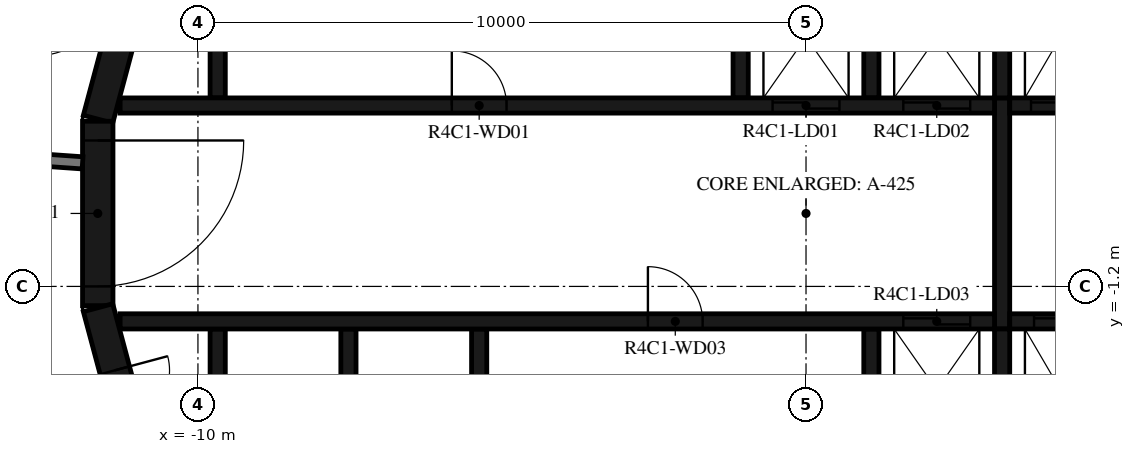
"""IFC4 building model, lengths in metres.
Left out: names, types, materials, properties, quantities, classifications, styles, units other than length and angle.
Written with IfcOpenShell. Run it as: python <this file> out.ifc"""

import sys

from ifc_helpers import new_model, si_unit, direction, frame, frame_2d, origin, place, context, subcontext, project, spatial, polyline, rectangle, outline, extrude, element, fill, save


model = new_model("IFC4")
c1 = context("Model", 3, precision=1e-05, world=origin(), true_north=direction((0.0, 1.0)))
c2 = subcontext(c1, "Body", "Model", "MODEL_VIEW")
j1 = project(units=[si_unit("LENGTHUNIT", "METRE"), si_unit("PLANEANGLEUNIT", "RADIAN")], contexts=[c1])
p1 = place(None, origin())
s1 = spatial("IfcSite", under=j1, at=p1, CompositionType="ELEMENT")
p2 = place(p1, origin())
s2 = spatial("IfcBuilding", under=s1, at=p2, CompositionType="ELEMENT")
p3 = place(p2, frame((0.0, 0.0, 176.2)))
s3 = spatial("IfcBuildingStorey", under=s2, at=p3, CompositionType="ELEMENT", Elevation=176.2)
p4 = place(p3, frame((-10.858, 4.479, 0.0), z_axis=(0.0, 0.0, 1.0), x_axis=(-0.258734743916, -0.965948410781, 0.0)))
e1 = element("IfcWall", 1, at=p4, inside=s3, PredefinedType="SHEAR", context=c2, shape_type="SweptSolid", body=[
    extrude(rectangle(XDim=3.033, YDim=0.5, at=frame_2d((1.516, 0.0))), origin(), (0.0, 0.0, 1.0), 3.12),
])
p5 = place(p3, frame((-11.647, 1.516, 0.0), z_axis=(0.0, 0.0, 1.0), x_axis=(0.0, -1.0, 0.0)))
e2 = element("IfcWall", 2, at=p5, inside=s3, PredefinedType="SHEAR", context=c2, shape_type="SweptSolid", body=[
    extrude(rectangle(XDim=3.033, YDim=0.5, at=frame_2d((1.516, 0.0))), origin(), (0.0, 0.0, 1.0), 3.12),
])
p6 = place(p5, frame((0.316, 0.0, 0.0)))
e3 = element("IfcOpeningElement", 3, at=p6, cuts=e2, PredefinedType="OPENING", context=c2, shape_type="SweptSolid", body=[
    extrude(rectangle(XDim=2.4, YDim=2.1, at=frame_2d((1.2, 1.05))), frame((0.0, 0.26, 0.0), z_axis=(0.0, -1.0, 0.0), x_axis=(1.0, 0.0, 0.0)), (0.0, 0.0, 1.0), 0.52),
])
p7 = place(p3, frame((-11.643, -1.55, 0.0), z_axis=(0.0, 0.0, 1.0), x_axis=(0.258734743916, -0.965948410781, 0.0)))
e4 = element("IfcWall", 4, at=p7, inside=s3, PredefinedType="SHEAR", context=c2, shape_type="SweptSolid", body=[
    extrude(rectangle(XDim=3.033, YDim=0.5, at=frame_2d((1.516, 0.0))), origin(), (0.0, 0.0, 1.0), 3.12),
])
p8 = place(p7, frame((1.066, 0.0, 0.0)))
e5 = element("IfcOpeningElement", 5, at=p8, cuts=e4, PredefinedType="OPENING", context=c2, shape_type="SweptSolid", body=[
    extrude(rectangle(XDim=0.9, YDim=2.1, at=frame_2d((0.45, 1.05))), frame((0.0, 0.26, 0.0), z_axis=(0.0, -1.0, 0.0), x_axis=(1.0, 0.0, 0.0)), (0.0, 0.0, 1.0), 0.52),
])
p9 = place(p3, origin())
e6 = element("IfcWall", 6, at=p9, inside=s3, PredefinedType="SHEAR", context=c2, shape_type="SweptSolid", body=[
    extrude(outline(polyline([(-9.55, 4.8), (-1.2, 4.8), (-1.2, 1.9), (-0.95, 1.9), (-0.95, 4.8), (0.95, 4.8), (0.95, 1.9), (1.2, 1.9), (1.2, 4.8), (3.1, 4.8), (3.1, 1.9), (3.35, 1.9), (3.35, 4.8), (5.25, 4.8), (5.25, 1.9), (5.5, 1.9), (5.5, 4.8), (7.4, 4.8), (7.4, 1.9), (7.65, 1.9), (7.65, 4.8), (9.55, 4.8), (9.55, 1.9), (9.8, 1.9), (9.8, 4.8), (9.8, 5.05), (-9.8, 5.05), (-9.8, 4.8), (-9.8, 1.9), (-9.55, 1.9), (-9.55, 4.8)])), origin(), (0.0, 0.0, 1.0), 3.12),
])
p10 = place(p3, origin())
e7 = element("IfcWall", 7, at=p10, inside=s3, PredefinedType="SHEAR", context=c2, shape_type="SweptSolid", body=[
    extrude(outline(polyline([(9.8, -5.05), (9.8, -4.8), (9.8, -1.9), (9.55, -1.9), (9.55, -4.8), (7.65, -4.8), (7.65, -1.9), (7.4, -1.9), (7.4, -4.8), (5.5, -4.8), (5.5, -1.9), (5.25, -1.9), (5.25, -4.8), (3.35, -4.8), (3.35, -1.9), (3.1, -1.9), (3.1, -4.8), (1.2, -4.8), (1.2, -1.9), (0.95, -1.9), (0.95, -4.8), (-5.25, -4.8), (-5.25, -1.9), (-5.5, -1.9), (-5.5, -4.8), (-7.4, -4.8), (-7.4, -1.9), (-7.65, -1.9), (-7.65, -4.8), (-9.55, -4.8), (-9.55, -1.9), (-9.8, -1.9), (-9.8, -4.8), (-9.8, -5.05), (9.8, -5.05)])), origin(), (0.0, 0.0, 1.0), 3.12),
])
p11 = place(p3, frame((-11.28, 1.775, 0.0), z_axis=(0.0, 0.0, 1.0), x_axis=(1.0, 0.0, 0.0)))
e8 = element("IfcWall", 8, at=p11, inside=s3, PredefinedType="SHEAR", context=c2, shape_type="SweptSolid", body=[
    extrude(rectangle(XDim=14.38, YDim=0.25, at=frame_2d((7.19, 0.0))), origin(), (0.0, 0.0, 1.0), 3.12),
])
p12 = place(p11, frame((10.73, 0.0, 0.0)))
e9 = element("IfcOpeningElement", 9, at=p12, cuts=e8, PredefinedType="OPENING", context=c2, shape_type="SweptSolid", body=[
    extrude(rectangle(XDim=1.1, YDim=2.1, at=frame_2d((0.55, 1.05))), frame((0.0, 0.135, 0.0), z_axis=(0.0, -1.0, 0.0), x_axis=(1.0, 0.0, 0.0)), (0.0, 0.0, 1.0), 0.27),
])
p13 = place(p11, frame((12.88, 0.0, 0.0)))
e10 = element("IfcOpeningElement", 10, at=p13, cuts=e8, PredefinedType="OPENING", context=c2, shape_type="SweptSolid", body=[
    extrude(rectangle(XDim=1.1, YDim=2.1, at=frame_2d((0.55, 1.05))), frame((0.0, 0.135, 0.0), z_axis=(0.0, -1.0, 0.0), x_axis=(1.0, 0.0, 0.0)), (0.0, 0.0, 1.0), 0.27),
])
p14 = place(p11, frame((5.455, 0.0, 0.0)))
e11 = element("IfcOpeningElement", 11, at=p14, cuts=e8, PredefinedType="OPENING", context=c2, shape_type="SweptSolid", body=[
    extrude(rectangle(XDim=0.9, YDim=2.1, at=frame_2d((0.45, 1.05))), frame((0.0, 0.135, 0.0), z_axis=(0.0, -1.0, 0.0), x_axis=(1.0, 0.0, 0.0)), (0.0, 0.0, 1.0), 0.27),
])
p15 = place(p3, frame((3.35, 1.775, 0.0), z_axis=(0.0, 0.0, 1.0), x_axis=(1.0, 0.0, 0.0)))
e12 = element("IfcWall", 12, at=p15, inside=s3, PredefinedType="SHEAR", context=c2, shape_type="SweptSolid", body=[
    extrude(rectangle(XDim=7.93, YDim=0.25, at=frame_2d((3.965, 0.0))), origin(), (0.0, 0.0, 1.0), 3.12),
])
p16 = place(p15, frame((0.35, 0.0, 0.0)))
e13 = element("IfcOpeningElement", 13, at=p16, cuts=e12, PredefinedType="OPENING", context=c2, shape_type="SweptSolid", body=[
    extrude(rectangle(XDim=1.2, YDim=2.4, at=frame_2d((0.6, 1.2))), frame((0.0, 0.135, 0.0), z_axis=(0.0, -1.0, 0.0), x_axis=(1.0, 0.0, 0.0)), (0.0, 0.0, 1.0), 0.27),
])
p17 = place(p15, frame((2.5, 0.0, 0.0)))
e14 = element("IfcOpeningElement", 14, at=p17, cuts=e12, PredefinedType="OPENING", context=c2, shape_type="SweptSolid", body=[
    extrude(rectangle(XDim=1.2, YDim=2.4, at=frame_2d((0.6, 1.2))), frame((0.0, 0.135, 0.0), z_axis=(0.0, -1.0, 0.0), x_axis=(1.0, 0.0, 0.0)), (0.0, 0.0, 1.0), 0.27),
])
p18 = place(p15, frame((4.8, 0.0, 0.0)))
e15 = element("IfcOpeningElement", 15, at=p18, cuts=e12, PredefinedType="OPENING", context=c2, shape_type="SweptSolid", body=[
    extrude(rectangle(XDim=0.9, YDim=2.1, at=frame_2d((0.45, 1.05))), frame((0.0, 0.135, 0.0), z_axis=(0.0, -1.0, 0.0), x_axis=(1.0, 0.0, 0.0)), (0.0, 0.0, 1.0), 0.27),
])
p19 = place(p3, frame((-11.28, -1.775, 0.0), z_axis=(0.0, 0.0, 1.0), x_axis=(1.0, 0.0, 0.0)))
e16 = element("IfcWall", 16, at=p19, inside=s3, PredefinedType="SHEAR", context=c2, shape_type="SweptSolid", body=[
    extrude(rectangle(XDim=14.38, YDim=0.25, at=frame_2d((7.19, 0.0))), origin(), (0.0, 0.0, 1.0), 3.12),
])
p20 = place(p19, frame((12.88, 0.0, 0.0)))
e17 = element("IfcOpeningElement", 17, at=p20, cuts=e16, PredefinedType="OPENING", context=c2, shape_type="SweptSolid", body=[
    extrude(rectangle(XDim=1.1, YDim=2.1, at=frame_2d((0.55, 1.05))), frame((0.0, 0.135, 0.0), z_axis=(0.0, -1.0, 0.0), x_axis=(1.0, 0.0, 0.0)), (0.0, 0.0, 1.0), 0.27),
])
p21 = place(p19, frame((8.68, 0.0, 0.0)))
e18 = element("IfcOpeningElement", 18, at=p21, cuts=e16, PredefinedType="OPENING", context=c2, shape_type="SweptSolid", body=[
    extrude(rectangle(XDim=0.9, YDim=2.1, at=frame_2d((0.45, 1.05))), frame((0.0, 0.135, 0.0), z_axis=(0.0, -1.0, 0.0), x_axis=(1.0, 0.0, 0.0)), (0.0, 0.0, 1.0), 0.27),
])
p22 = place(p3, frame((3.35, -1.775, 0.0), z_axis=(0.0, 0.0, 1.0), x_axis=(1.0, 0.0, 0.0)))
e19 = element("IfcWall", 19, at=p22, inside=s3, PredefinedType="SHEAR", context=c2, shape_type="SweptSolid", body=[
    extrude(rectangle(XDim=7.93, YDim=0.25, at=frame_2d((3.965, 0.0))), origin(), (0.0, 0.0, 1.0), 3.12),
])
p23 = place(p22, frame((0.4, 0.0, 0.0)))
e20 = element("IfcOpeningElement", 20, at=p23, cuts=e19, PredefinedType="OPENING", context=c2, shape_type="SweptSolid", body=[
    extrude(rectangle(XDim=1.1, YDim=2.4, at=frame_2d((0.55, 1.2))), frame((0.0, 0.135, 0.0), z_axis=(0.0, -1.0, 0.0), x_axis=(1.0, 0.0, 0.0)), (0.0, 0.0, 1.0), 0.27),
])
p24 = place(p22, frame((2.55, 0.0, 0.0)))
e21 = element("IfcOpeningElement", 21, at=p24, cuts=e19, PredefinedType="OPENING", context=c2, shape_type="SweptSolid", body=[
    extrude(rectangle(XDim=1.1, YDim=2.4, at=frame_2d((0.55, 1.2))), frame((0.0, 0.135, 0.0), z_axis=(0.0, -1.0, 0.0), x_axis=(1.0, 0.0, 0.0)), (0.0, 0.0, 1.0), 0.27),
])
p25 = place(p22, frame((4.7, 0.0, 0.0)))
e22 = element("IfcOpeningElement", 22, at=p25, cuts=e19, PredefinedType="OPENING", context=c2, shape_type="SweptSolid", body=[
    extrude(rectangle(XDim=1.1, YDim=2.4, at=frame_2d((0.55, 1.2))), frame((0.0, 0.135, 0.0), z_axis=(0.0, -1.0, 0.0), x_axis=(1.0, 0.0, 0.0)), (0.0, 0.0, 1.0), 0.27),
])
p26 = place(p3, frame((3.225, -1.9, 0.0), z_axis=(0.0, 0.0, 1.0), x_axis=(0.0, 1.0, 0.0)))
e23 = element("IfcWall", 23, at=p26, inside=s3, PredefinedType="SHEAR", context=c2, shape_type="SweptSolid", body=[
    extrude(rectangle(XDim=3.8, YDim=0.25, at=frame_2d((1.9, 0.0))), origin(), (0.0, 0.0, 1.0), 3.12),
])
p27 = place(p3, frame((-13.454, 0.941, 0.0), z_axis=(0.0, 0.0, 1.0), x_axis=(0.99755155062, -0.069934997354, 0.0)))
e24 = element("IfcWall", 24, at=p27, inside=s3, PredefinedType="STANDARD", context=c2, shape_type="SweptSolid", body=[
    extrude(rectangle(XDim=1.561, YDim=0.2, at=frame_2d((0.78, 0.0))), origin(), (0.0, 0.0, 1.0), 3.12),
])
p28 = place(p6, origin())
e25 = element("IfcDoor", 25, at=p28, inside=s3, OperationType="DOUBLE_DOOR_SINGLE_SWING", PredefinedType="DOOR", context=c2, shape_type="SweptSolid", body=[
    extrude(rectangle(XDim=2.4, YDim=2.1, at=frame_2d((1.2, 1.05))), frame((0.0, 0.025, 0.0), z_axis=(0.0, -1.0, 0.0), x_axis=(1.0, 0.0, 0.0)), (0.0, 0.0, 1.0), 0.05),
])
fill(e3, e25)
p29 = place(p12, origin())
e26 = element("IfcDoor", 26, at=p29, inside=s3, OperationType="DOUBLE_DOOR_SLIDING", PredefinedType="DOOR", context=c2, shape_type="SweptSolid", body=[
    extrude(rectangle(XDim=1.1, YDim=2.1, at=frame_2d((0.55, 1.05))), frame((0.0, 0.025, 0.0), z_axis=(0.0, -1.0, 0.0), x_axis=(1.0, 0.0, 0.0)), (0.0, 0.0, 1.0), 0.05),
])
fill(e9, e26)
p30 = place(p13, origin())
e27 = element("IfcDoor", 27, at=p30, inside=s3, OperationType="DOUBLE_DOOR_SLIDING", PredefinedType="DOOR", context=c2, shape_type="SweptSolid", body=[
    extrude(rectangle(XDim=1.1, YDim=2.1, at=frame_2d((0.55, 1.05))), frame((0.0, 0.025, 0.0), z_axis=(0.0, -1.0, 0.0), x_axis=(1.0, 0.0, 0.0)), (0.0, 0.0, 1.0), 0.05),
])
fill(e10, e27)
p31 = place(p16, origin())
e28 = element("IfcDoor", 28, at=p31, inside=s3, OperationType="DOUBLE_DOOR_SLIDING", PredefinedType="DOOR", context=c2, shape_type="SweptSolid", body=[
    extrude(rectangle(XDim=1.2, YDim=2.4, at=frame_2d((0.6, 1.2))), frame((0.0, 0.025, 0.0), z_axis=(0.0, -1.0, 0.0), x_axis=(1.0, 0.0, 0.0)), (0.0, 0.0, 1.0), 0.05),
])
fill(e13, e28)
p32 = place(p20, origin())
e29 = element("IfcDoor", 29, at=p32, inside=s3, OperationType="DOUBLE_DOOR_SLIDING", PredefinedType="DOOR", context=c2, shape_type="SweptSolid", body=[
    extrude(rectangle(XDim=1.1, YDim=2.1, at=frame_2d((0.55, 1.05))), frame((0.0, 0.025, 0.0), z_axis=(0.0, -1.0, 0.0), x_axis=(1.0, 0.0, 0.0)), (0.0, 0.0, 1.0), 0.05),
])
fill(e17, e29)
p33 = place(p23, origin())
e30 = element("IfcDoor", 30, at=p33, inside=s3, OperationType="DOUBLE_DOOR_SLIDING", PredefinedType="DOOR", context=c2, shape_type="SweptSolid", body=[
    extrude(rectangle(XDim=1.1, YDim=2.4, at=frame_2d((0.55, 1.2))), frame((0.0, 0.025, 0.0), z_axis=(0.0, -1.0, 0.0), x_axis=(1.0, 0.0, 0.0)), (0.0, 0.0, 1.0), 0.05),
])
fill(e20, e30)
p34 = place(p14, origin())
e31 = element("IfcDoor", 31, at=p34, inside=s3, OperationType="SINGLE_SWING_LEFT", PredefinedType="DOOR", context=c2, shape_type="SweptSolid", body=[
    extrude(rectangle(XDim=0.9, YDim=2.1, at=frame_2d((0.45, 1.05))), frame((0.0, 0.025, 0.0), z_axis=(0.0, -1.0, 0.0), x_axis=(1.0, 0.0, 0.0)), (0.0, 0.0, 1.0), 0.05),
])
fill(e11, e31)
p35 = place(p21, origin())
e32 = element("IfcDoor", 32, at=p35, inside=s3, OperationType="SINGLE_SWING_LEFT", PredefinedType="DOOR", context=c2, shape_type="SweptSolid", body=[
    extrude(rectangle(XDim=0.9, YDim=2.1, at=frame_2d((0.45, 1.05))), frame((0.0, 0.025, 0.0), z_axis=(0.0, -1.0, 0.0), x_axis=(1.0, 0.0, 0.0)), (0.0, 0.0, 1.0), 0.05),
])
fill(e18, e32)
p36 = place(p8, origin())
e33 = element("IfcDoor", 33, at=p36, inside=s3, OperationType="SINGLE_SWING_RIGHT", PredefinedType="DOOR", context=c2, shape_type="SweptSolid", body=[
    extrude(rectangle(XDim=0.9, YDim=2.1, at=frame_2d((0.45, 1.05))), frame((0.0, 0.025, 0.0), z_axis=(0.0, -1.0, 0.0), x_axis=(1.0, 0.0, 0.0)), (0.0, 0.0, 1.0), 0.05),
])
fill(e5, e33)
save(model, sys.argv[1])
